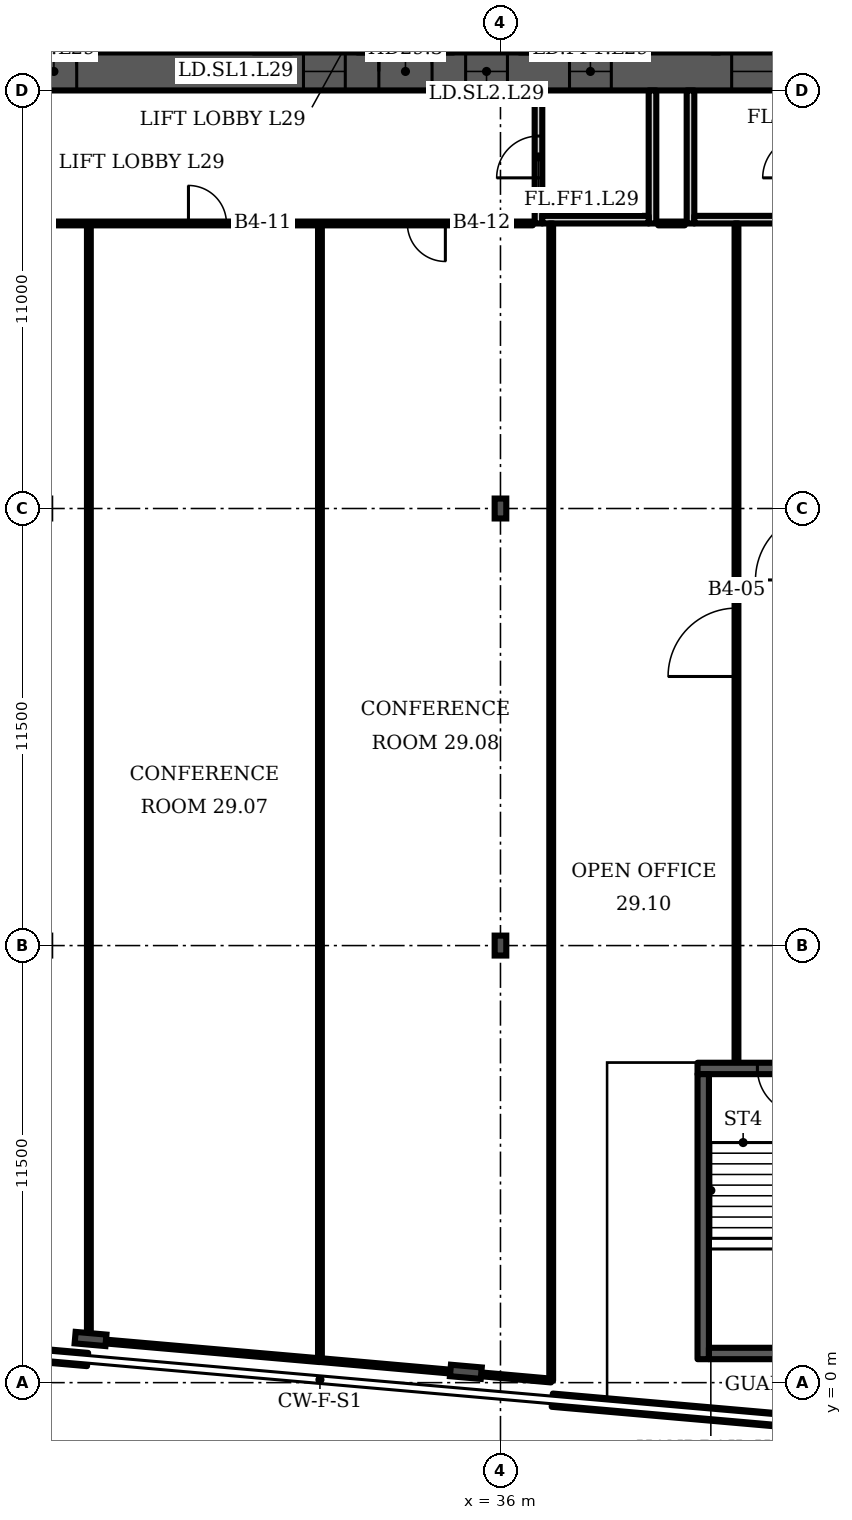
"""IFC4 building model, lengths in metres.
Left out: names, types, materials, properties, quantities, classifications, styles, units other than length and angle.
Written with IfcOpenShell. Run it as: python <this file> out.ifc"""

import sys

from ifc_helpers import new_model, si_unit, direction, frame, frame_2d, origin, origin_2d, place, context, subcontext, project, spatial, rectangle, i_section, extrude, element, fill, save


model = new_model("IFC4")
c1 = context("Model", 3, precision=1e-05, world=origin(), true_north=direction((0.0, 1.0)))
c2 = subcontext(c1, "Body", "Model", "MODEL_VIEW")
j1 = project(units=[si_unit("LENGTHUNIT", "METRE"), si_unit("PLANEANGLEUNIT", "RADIAN")], contexts=[c1])
p1 = place(None, origin())
s1 = spatial("IfcSite", under=j1, at=p1, CompositionType="ELEMENT")
p2 = place(p1, origin())
s2 = spatial("IfcBuilding", under=s1, at=p2, CompositionType="ELEMENT")
p3 = place(p2, frame((0.0, 0.0, 125.5)))
s3 = spatial("IfcBuildingStorey", under=s2, at=p3, CompositionType="ELEMENT", Elevation=125.5)
p4 = place(p3, frame((16.0, 34.5, 0.0), z_axis=(0.0, 0.0, 1.0), x_axis=(1.0, 0.0, 0.0)))
e1 = element("IfcWall", 1, at=p4, inside=s3, PredefinedType="SHEAR", context=c2, shape_type="SweptSolid", body=[
    extrude(rectangle(XDim=49.0, YDim=1.0, at=frame_2d((24.5, 0.0))), origin(), (0.0, 0.0, 1.0), 3.6),
])
p5 = place(p4, frame((1.2, 0.0, 0.0)))
e2 = element("IfcOpeningElement", 2, at=p5, cuts=e1, PredefinedType="OPENING", context=c2, shape_type="SweptSolid", body=[
    extrude(rectangle(XDim=1.1, YDim=2.1, at=frame_2d((0.55, 1.05))), frame((0.0, 0.51, 0.0), z_axis=(0.0, -1.0, 0.0), x_axis=(1.0, 0.0, 0.0)), (0.0, 0.0, 1.0), 1.02),
])
p6 = place(p4, frame((5.083, 0.0, 0.0)))
e3 = element("IfcOpeningElement", 3, at=p6, cuts=e1, PredefinedType="OPENING", context=c2, shape_type="SweptSolid", body=[
    extrude(rectangle(XDim=1.1, YDim=2.1, at=frame_2d((0.55, 1.05))), frame((0.0, 0.51, 0.0), z_axis=(0.0, -1.0, 0.0), x_axis=(1.0, 0.0, 0.0)), (0.0, 0.0, 1.0), 1.02),
])
p7 = place(p4, frame((2.933, 0.0, 0.0)))
e4 = element("IfcOpeningElement", 4, at=p7, cuts=e1, PredefinedType="OPENING", context=c2, shape_type="SweptSolid", body=[
    extrude(rectangle(XDim=1.4, YDim=2.1, at=frame_2d((0.7, 1.05))), frame((0.0, 0.51, 0.0), z_axis=(0.0, -1.0, 0.0), x_axis=(1.0, 0.0, 0.0)), (0.0, 0.0, 1.0), 1.02),
])
p8 = place(p4, frame((7.65, 0.0, 0.0)))
e5 = element("IfcOpeningElement", 5, at=p8, cuts=e1, PredefinedType="OPENING", context=c2, shape_type="SweptSolid", body=[
    extrude(rectangle(XDim=1.2, YDim=2.1, at=frame_2d((0.6, 1.05))), frame((0.0, 0.51, 0.0), z_axis=(0.0, -1.0, 0.0), x_axis=(1.0, 0.0, 0.0)), (0.0, 0.0, 1.0), 1.02),
])
p9 = place(p4, frame((14.817, 0.0, 0.0)))
e6 = element("IfcOpeningElement", 6, at=p9, cuts=e1, PredefinedType="OPENING", context=c2, shape_type="SweptSolid", body=[
    extrude(rectangle(XDim=1.1, YDim=2.1, at=frame_2d((0.55, 1.05))), frame((0.0, 0.51, 0.0), z_axis=(0.0, -1.0, 0.0), x_axis=(1.0, 0.0, 0.0)), (0.0, 0.0, 1.0), 1.02),
])
p10 = place(p4, frame((19.083, 0.0, 0.0)))
e7 = element("IfcOpeningElement", 7, at=p10, cuts=e1, PredefinedType="OPENING", context=c2, shape_type="SweptSolid", body=[
    extrude(rectangle(XDim=1.1, YDim=2.1, at=frame_2d((0.55, 1.05))), frame((0.0, 0.51, 0.0), z_axis=(0.0, -1.0, 0.0), x_axis=(1.0, 0.0, 0.0)), (0.0, 0.0, 1.0), 1.02),
])
p11 = place(p4, frame((16.8, 0.0, 0.0)))
e8 = element("IfcOpeningElement", 8, at=p11, cuts=e1, PredefinedType="OPENING", context=c2, shape_type="SweptSolid", body=[
    extrude(rectangle(XDim=1.4, YDim=2.1, at=frame_2d((0.7, 1.05))), frame((0.0, 0.51, 0.0), z_axis=(0.0, -1.0, 0.0), x_axis=(1.0, 0.0, 0.0)), (0.0, 0.0, 1.0), 1.02),
])
p12 = place(p4, frame((21.817, 0.0, 0.0)))
e9 = element("IfcOpeningElement", 9, at=p12, cuts=e1, PredefinedType="OPENING", context=c2, shape_type="SweptSolid", body=[
    extrude(rectangle(XDim=1.1, YDim=2.1, at=frame_2d((0.55, 1.05))), frame((0.0, 0.51, 0.0), z_axis=(0.0, -1.0, 0.0), x_axis=(1.0, 0.0, 0.0)), (0.0, 0.0, 1.0), 1.02),
])
p13 = place(p4, frame((26.083, 0.0, 0.0)))
e10 = element("IfcOpeningElement", 10, at=p13, cuts=e1, PredefinedType="OPENING", context=c2, shape_type="SweptSolid", body=[
    extrude(rectangle(XDim=1.1, YDim=2.1, at=frame_2d((0.55, 1.05))), frame((0.0, 0.51, 0.0), z_axis=(0.0, -1.0, 0.0), x_axis=(1.0, 0.0, 0.0)), (0.0, 0.0, 1.0), 1.02),
])
p14 = place(p4, frame((33.15, 0.0, 0.0)))
e11 = element("IfcOpeningElement", 11, at=p14, cuts=e1, PredefinedType="OPENING", context=c2, shape_type="SweptSolid", body=[
    extrude(rectangle(XDim=1.2, YDim=2.1, at=frame_2d((0.6, 1.05))), frame((0.0, 0.51, 0.0), z_axis=(0.0, -1.0, 0.0), x_axis=(1.0, 0.0, 0.0)), (0.0, 0.0, 1.0), 1.02),
])
p15 = place(p4, frame((37.8, 0.0, 0.0)))
e12 = element("IfcOpeningElement", 12, at=p15, cuts=e1, PredefinedType="OPENING", context=c2, shape_type="SweptSolid", body=[
    extrude(rectangle(XDim=1.4, YDim=2.1, at=frame_2d((0.7, 1.05))), frame((0.0, 0.51, 0.0), z_axis=(0.0, -1.0, 0.0), x_axis=(1.0, 0.0, 0.0)), (0.0, 0.0, 1.0), 1.02),
])
p16 = place(p4, frame((42.817, 0.0, 0.0)))
e13 = element("IfcOpeningElement", 13, at=p16, cuts=e1, PredefinedType="OPENING", context=c2, shape_type="SweptSolid", body=[
    extrude(rectangle(XDim=1.1, YDim=2.1, at=frame_2d((0.55, 1.05))), frame((0.0, 0.51, 0.0), z_axis=(0.0, -1.0, 0.0), x_axis=(1.0, 0.0, 0.0)), (0.0, 0.0, 1.0), 1.02),
])
p17 = place(p4, frame((46.7, 0.0, 0.0)))
e14 = element("IfcOpeningElement", 14, at=p17, cuts=e1, PredefinedType="OPENING", context=c2, shape_type="SweptSolid", body=[
    extrude(rectangle(XDim=1.1, YDim=2.1, at=frame_2d((0.55, 1.05))), frame((0.0, 0.51, 0.0), z_axis=(0.0, -1.0, 0.0), x_axis=(1.0, 0.0, 0.0)), (0.0, 0.0, 1.0), 1.02),
])
p18 = place(p4, frame((44.667, 0.0, 0.0)))
e15 = element("IfcOpeningElement", 15, at=p18, cuts=e1, PredefinedType="OPENING", context=c2, shape_type="SweptSolid", body=[
    extrude(rectangle(XDim=1.4, YDim=2.1, at=frame_2d((0.7, 1.05))), frame((0.0, 0.51, 0.0), z_axis=(0.0, -1.0, 0.0), x_axis=(1.0, 0.0, 0.0)), (0.0, 0.0, 1.0), 1.02),
])
for number, where, z_axis, x_axis in (
    (16, (25.214, 1.149, 0.0), (0.0, 0.0, 1.0), (-0.087, -0.996, 0.0)),
    (17, (35.089, 0.285, 0.0), (0.0, 0.0, 1.0), (-0.087, -0.996, 0.0)),
):
    element("IfcColumn", number, at=place(p3, frame(where, z_axis=z_axis, x_axis=x_axis)), inside=s3, PredefinedType="COLUMN", context=c2, shape_type="SweptSolid", body=[
        extrude(i_section(OverallWidth=0.303, OverallDepth=0.814, WebThickness=0.021, FlangeThickness=0.04, FilletRadius=0.03, at=origin_2d()), origin(), (0.0, 0.0, 1.0), 3.6),
    ])
for number, where, z_axis, x_axis in (
    (18, (36.0, 11.5, 0.0), (0.0, 0.0, 1.0), (1.0, 0.0, 0.0)),
    (19, (36.0, 23.0, 0.0), (0.0, 0.0, 1.0), (1.0, 0.0, 0.0)),
):
    element("IfcColumn", number, at=place(p3, frame(where, z_axis=z_axis, x_axis=x_axis)), inside=s3, PredefinedType="COLUMN", context=c2, shape_type="SweptSolid", body=[
        extrude(i_section(OverallWidth=0.306, OverallDepth=0.524, WebThickness=0.021, FlangeThickness=0.04, FilletRadius=0.027, at=origin_2d()), origin(), (0.0, 0.0, 1.0), 3.6),
    ])
p19 = place(p3, frame((12.835, 1.685, 0.0), z_axis=(0.0, 0.0, 1.0), x_axis=(0.996192, -0.087173, 0.0)))
e20 = element("IfcWall", 20, at=p19, inside=s3, PredefinedType="SOLIDWALL", context=c2, shape_type="SweptSolid", body=[
    extrude(rectangle(XDim=12.348, YDim=0.35, at=frame_2d((6.174, 0.0))), origin(), (0.0, 0.0, 1.0), 1.0),
])
p20 = place(p3, frame((37.363, -0.461, 0.0), z_axis=(0.0, 0.0, 1.0), x_axis=(0.996194, -0.087159, 0.0)))
e21 = element("IfcWall", 21, at=p20, inside=s3, PredefinedType="SOLIDWALL", context=c2, shape_type="SweptSolid", body=[
    extrude(rectangle(XDim=12.199, YDim=0.35, at=frame_2d((6.099, 0.0))), origin(), (0.0, 0.0, 1.0), 1.0),
])
p21 = place(p3, frame((37.0, 30.5, 0.0), z_axis=(0.0, 0.0, 1.0), x_axis=(0.0, 1.0, 0.0)))
e22 = element("IfcWall", 22, at=p21, inside=s3, PredefinedType="PARTITIONING", context=c2, shape_type="SweptSolid", body=[
    extrude(rectangle(XDim=3.5, YDim=0.2, at=frame_2d((1.75, 0.0))), origin(), (0.0, 0.0, 1.0), 3.2),
])
p22 = place(p21, frame((1.2, 0.0, 0.0)))
e23 = element("IfcOpeningElement", 23, at=p22, cuts=e22, PredefinedType="OPENING", context=c2, shape_type="SweptSolid", body=[
    extrude(rectangle(XDim=1.1, YDim=2.1, at=frame_2d((0.55, 1.05))), frame((0.0, 0.11, 0.0), z_axis=(0.0, -1.0, 0.0), x_axis=(1.0, 0.0, 0.0)), (0.0, 0.0, 1.0), 0.22),
])
p23 = place(p3, frame((40.0, 30.5, 0.0), z_axis=(0.0, 0.0, 1.0), x_axis=(0.0, 1.0, 0.0)))
e24 = element("IfcWall", 24, at=p23, inside=s3, PredefinedType="PARTITIONING", context=c2, shape_type="SweptSolid", body=[
    extrude(rectangle(XDim=3.5, YDim=0.2, at=frame_2d((1.75, 0.0))), origin(), (0.0, 0.0, 1.0), 3.2),
])
p24 = place(p3, frame((37.1, 30.6, 0.0), z_axis=(0.0, 0.0, 1.0), x_axis=(1.0, 0.0, 0.0)))
e25 = element("IfcWall", 25, at=p24, inside=s3, PredefinedType="PARTITIONING", context=c2, shape_type="SweptSolid", body=[
    extrude(rectangle(XDim=2.8, YDim=0.2, at=frame_2d((1.4, 0.0))), origin(), (0.0, 0.0, 1.0), 3.2),
])
p25 = place(p3, frame((41.0, 30.5, 0.0), z_axis=(0.0, 0.0, 1.0), x_axis=(0.0, 1.0, 0.0)))
e26 = element("IfcWall", 26, at=p25, inside=s3, PredefinedType="PARTITIONING", context=c2, shape_type="SweptSolid", body=[
    extrude(rectangle(XDim=3.5, YDim=0.2, at=frame_2d((1.75, 0.0))), origin(), (0.0, 0.0, 1.0), 3.2),
])
p26 = place(p3, frame((41.1, 30.6, 0.0), z_axis=(0.0, 0.0, 1.0), x_axis=(1.0, 0.0, 0.0)))
e27 = element("IfcWall", 27, at=p26, inside=s3, PredefinedType="PARTITIONING", context=c2, shape_type="SweptSolid", body=[
    extrude(rectangle(XDim=2.8, YDim=0.2, at=frame_2d((1.4, 0.0))), origin(), (0.0, 0.0, 1.0), 3.2),
])
p27 = place(p3, frame((41.185, 8.267, 0.0), z_axis=(0.0, 0.0, 1.0), x_axis=(1.0, 0.0, 0.0)))
e28 = element("IfcWall", 28, at=p27, inside=s3, PredefinedType="SHEAR", context=c2, shape_type="SweptSolid", body=[
    extrude(rectangle(XDim=4.35, YDim=0.3, at=frame_2d((2.175, 0.0))), origin(), (0.0, 0.0, 1.0), 3.2),
])
p28 = place(p27, frame((1.575, 0.0, 0.0)))
e29 = element("IfcOpeningElement", 29, at=p28, cuts=e28, PredefinedType="OPENING", context=c2, shape_type="SweptSolid", body=[
    extrude(rectangle(XDim=1.2, YDim=2.1, at=frame_2d((0.6, 1.05))), frame((0.0, 0.16, 0.0), z_axis=(0.0, -1.0, 0.0), x_axis=(1.0, 0.0, 0.0)), (0.0, 0.0, 1.0), 0.32),
])
p29 = place(p3, frame((17.8, 30.5, 0.0), z_axis=(0.0, 0.0, 1.0), x_axis=(1.0, 0.0, 0.0)))
e30 = element("IfcWall", 30, at=p29, inside=s3, PredefinedType="PARTITIONING", context=c2, shape_type="SweptSolid", body=[
    extrude(rectangle(XDim=19.05, YDim=0.1, at=frame_2d((9.525, 0.0))), origin(), (0.0, 0.0, 1.0), 3.2),
])
p30 = place(p29, frame((2.9, 0.0, 0.0)))
e31 = element("IfcOpeningElement", 31, at=p30, cuts=e30, PredefinedType="OPENING", context=c2, shape_type="SweptSolid", body=[
    extrude(rectangle(XDim=1.8, YDim=2.1, at=frame_2d((0.9, 1.05))), frame((0.0, 0.06, 0.0), z_axis=(0.0, -1.0, 0.0), x_axis=(1.0, 0.0, 0.0)), (0.0, 0.0, 1.0), 0.12),
])
p31 = place(p29, frame((9.99, 0.0, 0.0)))
e32 = element("IfcOpeningElement", 32, at=p31, cuts=e30, PredefinedType="OPENING", context=c2, shape_type="SweptSolid", body=[
    extrude(rectangle(XDim=1.0, YDim=2.1, at=frame_2d((0.5, 1.05))), frame((0.0, 0.06, 0.0), z_axis=(0.0, -1.0, 0.0), x_axis=(1.0, 0.0, 0.0)), (0.0, 0.0, 1.0), 0.12),
])
p32 = place(p29, frame((15.75, 0.0, 0.0)))
e33 = element("IfcOpeningElement", 33, at=p32, cuts=e30, PredefinedType="OPENING", context=c2, shape_type="SweptSolid", body=[
    extrude(rectangle(XDim=1.0, YDim=2.1, at=frame_2d((0.5, 1.05))), frame((0.0, 0.06, 0.0), z_axis=(0.0, -1.0, 0.0), x_axis=(1.0, 0.0, 0.0)), (0.0, 0.0, 1.0), 0.12),
])
p33 = place(p3, frame((25.17, 1.12, 0.0), z_axis=(0.0, 0.0, 1.0), x_axis=(0.0, 1.0, 0.0)))
e34 = element("IfcWall", 34, at=p33, inside=s3, PredefinedType="PARTITIONING", context=c2, shape_type="SweptSolid", body=[
    extrude(rectangle(XDim=29.38, YDim=0.1, at=frame_2d((14.69, 0.0))), origin(), (0.0, 0.0, 1.0), 3.2),
])
p34 = place(p3, frame((31.25, 0.59, 0.0), z_axis=(0.0, 0.0, 1.0), x_axis=(-0.996218, 0.086845, 0.0)))
e35 = element("IfcWall", 35, at=p34, inside=s3, PredefinedType="PARTITIONING", context=c2, shape_type="SweptSolid", body=[
    extrude(rectangle(XDim=6.103, YDim=0.1, at=frame_2d((3.052, 0.0))), origin(), (0.0, 0.0, 1.0), 2.58),
])
p35 = place(p3, frame((31.25, 0.59, 0.0), z_axis=(0.0, 0.0, 1.0), x_axis=(0.0, 1.0, 0.0)))
e36 = element("IfcWall", 36, at=p35, inside=s3, PredefinedType="PARTITIONING", context=c2, shape_type="SweptSolid", body=[
    extrude(rectangle(XDim=29.91, YDim=0.1, at=frame_2d((14.955, 0.0))), origin(), (0.0, 0.0, 1.0), 3.2),
])
p36 = place(p3, frame((37.335, 0.055, 0.0), z_axis=(0.0, 0.0, 1.0), x_axis=(-0.996095, 0.088253, 0.0)))
e37 = element("IfcWall", 37, at=p36, inside=s3, PredefinedType="PARTITIONING", context=c2, shape_type="SweptSolid", body=[
    extrude(rectangle(XDim=6.105, YDim=0.1, at=frame_2d((3.053, 0.0))), origin(), (0.0, 0.0, 1.0), 2.58),
])
p37 = place(p3, frame((37.335, 0.055, 0.0), z_axis=(0.0, 0.0, 1.0), x_axis=(0.0, 1.0, 0.0)))
e38 = element("IfcWall", 38, at=p37, inside=s3, PredefinedType="PARTITIONING", context=c2, shape_type="SweptSolid", body=[
    extrude(rectangle(XDim=30.445, YDim=0.1, at=frame_2d((15.223, 0.0))), origin(), (0.0, 0.0, 1.0), 3.2),
])
p38 = place(p3, frame((42.21, 8.437, 0.0), z_axis=(0.0, 0.0, 1.0), x_axis=(0.0, 1.0, 0.0)))
e39 = element("IfcWall", 39, at=p38, inside=s3, PredefinedType="PARTITIONING", context=c2, shape_type="SweptSolid", body=[
    extrude(rectangle(XDim=22.063, YDim=0.1, at=frame_2d((11.031, 0.0))), origin(), (0.0, 0.0, 1.0), 3.2),
])
p39 = place(p38, frame((10.143, 0.0, 0.0)))
e40 = element("IfcOpeningElement", 40, at=p39, cuts=e39, PredefinedType="OPENING", context=c2, shape_type="SweptSolid", body=[
    extrude(rectangle(XDim=1.8, YDim=2.1, at=frame_2d((0.9, 1.05))), frame((0.0, 0.06, 0.0), z_axis=(0.0, -1.0, 0.0), x_axis=(1.0, 0.0, 0.0)), (0.0, 0.0, 1.0), 0.12),
])
p40 = place(p3, frame((40.15, 30.5, 0.0), z_axis=(0.0, 0.0, 1.0), x_axis=(1.0, 0.0, 0.0)))
e41 = element("IfcWall", 41, at=p40, inside=s3, PredefinedType="PARTITIONING", context=c2, shape_type="SweptSolid", body=[
    extrude(rectangle(XDim=0.7, YDim=0.1, at=frame_2d((0.35, 0.0))), origin(), (0.0, 0.0, 1.0), 3.2),
])
p41 = place(p3, frame((41.335, 0.617, 0.0), z_axis=(0.0, 0.0, 1.0), x_axis=(0.0, 1.0, 0.0)))
e42 = element("IfcWall", 42, at=p41, inside=s3, PredefinedType="SHEAR", context=c2, shape_type="SweptSolid", body=[
    extrude(rectangle(XDim=7.5, YDim=0.3, at=frame_2d((3.75, 0.0))), origin(), (0.0, 0.0, 1.0), 3.2),
])
p42 = place(p3, frame((41.485, 0.767, 0.0), z_axis=(0.0, 0.0, 1.0), x_axis=(1.0, 0.0, 0.0)))
e43 = element("IfcWall", 43, at=p42, inside=s3, PredefinedType="SHEAR", context=c2, shape_type="SweptSolid", body=[
    extrude(rectangle(XDim=3.75, YDim=0.3, at=frame_2d((1.875, 0.0))), origin(), (0.0, 0.0, 1.0), 3.2),
])
p43 = place(p8, origin())
e44 = element("IfcDoor", 44, at=p43, inside=s3, OperationType="SINGLE_SWING_LEFT", PredefinedType="DOOR", context=c2, shape_type="SweptSolid", body=[
    extrude(rectangle(XDim=1.2, YDim=2.1, at=frame_2d((0.6, 1.05))), frame((0.0, 0.025, 0.0), z_axis=(0.0, -1.0, 0.0), x_axis=(1.0, 0.0, 0.0)), (0.0, 0.0, 1.0), 0.05),
])
fill(e5, e44)
p44 = place(p9, origin())
e45 = element("IfcDoor", 45, at=p44, inside=s3, OperationType="DOUBLE_DOOR_SLIDING", PredefinedType="DOOR", context=c2, shape_type="SweptSolid", body=[
    extrude(rectangle(XDim=1.1, YDim=2.1, at=frame_2d((0.55, 1.05))), frame((0.0, 0.025, 0.0), z_axis=(0.0, -1.0, 0.0), x_axis=(1.0, 0.0, 0.0)), (0.0, 0.0, 1.0), 0.05),
])
fill(e6, e45)
p45 = place(p10, origin())
e46 = element("IfcDoor", 46, at=p45, inside=s3, OperationType="DOUBLE_DOOR_SLIDING", PredefinedType="DOOR", context=c2, shape_type="SweptSolid", body=[
    extrude(rectangle(XDim=1.1, YDim=2.1, at=frame_2d((0.55, 1.05))), frame((0.0, 0.025, 0.0), z_axis=(0.0, -1.0, 0.0), x_axis=(1.0, 0.0, 0.0)), (0.0, 0.0, 1.0), 0.05),
])
fill(e7, e46)
p46 = place(p11, origin())
e47 = element("IfcDoor", 47, at=p46, inside=s3, OperationType="DOUBLE_DOOR_SINGLE_SWING", PredefinedType="DOOR", context=c2, shape_type="SweptSolid", body=[
    extrude(rectangle(XDim=1.4, YDim=2.1, at=frame_2d((0.7, 1.05))), frame((0.0, 0.025, 0.0), z_axis=(0.0, -1.0, 0.0), x_axis=(1.0, 0.0, 0.0)), (0.0, 0.0, 1.0), 0.05),
])
fill(e8, e47)
p47 = place(p12, origin())
e48 = element("IfcDoor", 48, at=p47, inside=s3, OperationType="DOUBLE_DOOR_SLIDING", PredefinedType="DOOR", context=c2, shape_type="SweptSolid", body=[
    extrude(rectangle(XDim=1.1, YDim=2.1, at=frame_2d((0.55, 1.05))), frame((0.0, 0.025, 0.0), z_axis=(0.0, -1.0, 0.0), x_axis=(1.0, 0.0, 0.0)), (0.0, 0.0, 1.0), 0.05),
])
fill(e9, e48)
p48 = place(p13, origin())
e49 = element("IfcDoor", 49, at=p48, inside=s3, OperationType="DOUBLE_DOOR_SLIDING", PredefinedType="DOOR", context=c2, shape_type="SweptSolid", body=[
    extrude(rectangle(XDim=1.1, YDim=2.1, at=frame_2d((0.55, 1.05))), frame((0.0, 0.025, 0.0), z_axis=(0.0, -1.0, 0.0), x_axis=(1.0, 0.0, 0.0)), (0.0, 0.0, 1.0), 0.05),
])
fill(e10, e49)
p49 = place(p22, origin())
e50 = element("IfcDoor", 50, at=p49, inside=s3, OperationType="SINGLE_SWING_LEFT", PredefinedType="DOOR", context=c2, shape_type="SweptSolid", body=[
    extrude(rectangle(XDim=1.1, YDim=2.1, at=frame_2d((0.55, 1.05))), frame((0.0, 0.025, 0.0), z_axis=(0.0, -1.0, 0.0), x_axis=(1.0, 0.0, 0.0)), (0.0, 0.0, 1.0), 0.05),
])
fill(e23, e50)
p50 = place(p28, origin())
e51 = element("IfcDoor", 51, at=p50, inside=s3, OperationType="SINGLE_SWING_RIGHT", PredefinedType="DOOR", context=c2, shape_type="SweptSolid", body=[
    extrude(rectangle(XDim=1.2, YDim=2.1, at=frame_2d((0.6, 1.05))), frame((0.0, 0.025, 0.0), z_axis=(0.0, -1.0, 0.0), x_axis=(1.0, 0.0, 0.0)), (0.0, 0.0, 1.0), 0.05),
])
fill(e29, e51)
p51 = place(p39, origin())
e52 = element("IfcDoor", 52, at=p51, inside=s3, OperationType="DOUBLE_DOOR_SINGLE_SWING", PredefinedType="DOOR", context=c2, shape_type="SweptSolid", body=[
    extrude(rectangle(XDim=1.8, YDim=2.1, at=frame_2d((0.9, 1.05))), frame((0.0, 0.025, 0.0), z_axis=(0.0, -1.0, 0.0), x_axis=(1.0, 0.0, 0.0)), (0.0, 0.0, 1.0), 0.05),
])
fill(e40, e52)
p52 = place(p31, origin())
e53 = element("IfcDoor", 53, at=p52, inside=s3, OperationType="SINGLE_SWING_LEFT", PredefinedType="DOOR", context=c2, shape_type="SweptSolid", body=[
    extrude(rectangle(XDim=1.0, YDim=2.1, at=frame_2d((0.5, 1.05))), frame((0.0, 0.025, 0.0), z_axis=(0.0, -1.0, 0.0), x_axis=(1.0, 0.0, 0.0)), (0.0, 0.0, 1.0), 0.05),
])
fill(e32, e53)
p53 = place(p32, origin())
e54 = element("IfcDoor", 54, at=p53, inside=s3, OperationType="SINGLE_SWING_RIGHT", PredefinedType="DOOR", context=c2, shape_type="SweptSolid", body=[
    extrude(rectangle(XDim=1.0, YDim=2.1, at=frame_2d((0.5, 1.05))), frame((0.0, 0.025, 0.0), z_axis=(0.0, -1.0, 0.0), x_axis=(1.0, 0.0, 0.0)), (0.0, 0.0, 1.0), 0.05),
])
fill(e33, e54)
save(model, sys.argv[1])
